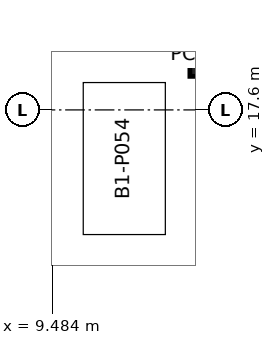
"""IFC4 building model, lengths in metres.
Left out: names, types, materials, properties, quantities, classifications, styles, units other than length and angle.
Written with IfcOpenShell. Run it as: python <this file> out.ifc"""

import sys

from ifc_helpers import new_model, si_unit, direction, frame, origin, origin_2d, place, context, subcontext, project, spatial, rectangle, extrude, element, save


model = new_model("IFC4")
c1 = context("Model", 3, precision=1e-05, world=origin(), true_north=direction((0.0, 1.0)))
c2 = subcontext(c1, "Body", "Model", "MODEL_VIEW")
j1 = project(units=[si_unit("LENGTHUNIT", "METRE"), si_unit("PLANEANGLEUNIT", "RADIAN")], contexts=[c1])
p1 = place(None, origin())
s1 = spatial("IfcSite", under=j1, at=p1, CompositionType="ELEMENT")
p2 = place(p1, origin())
s2 = spatial("IfcBuilding", under=s1, at=p2, CompositionType="ELEMENT")
p3 = place(p2, frame((0.0, 0.0, -4.5)))
s3 = spatial("IfcBuildingStorey", under=s2, at=p3, CompositionType="ELEMENT", Elevation=-4.5)
p4 = place(p3, frame((14.708, 19.404, 0.0), z_axis=(0.0, 0.0, 1.0), x_axis=(-0.555816910562, 0.8313047347, 0.0)))
e1 = element("IfcColumn", 1, at=p4, inside=s3, PredefinedType="COLUMN", context=c2, shape_type="SweptSolid", body=[
    extrude(rectangle(XDim=1.4, YDim=1.4, at=origin_2d()), origin(), (0.0, 0.0, 1.0), 4.5),
])
save(model, sys.argv[1])
